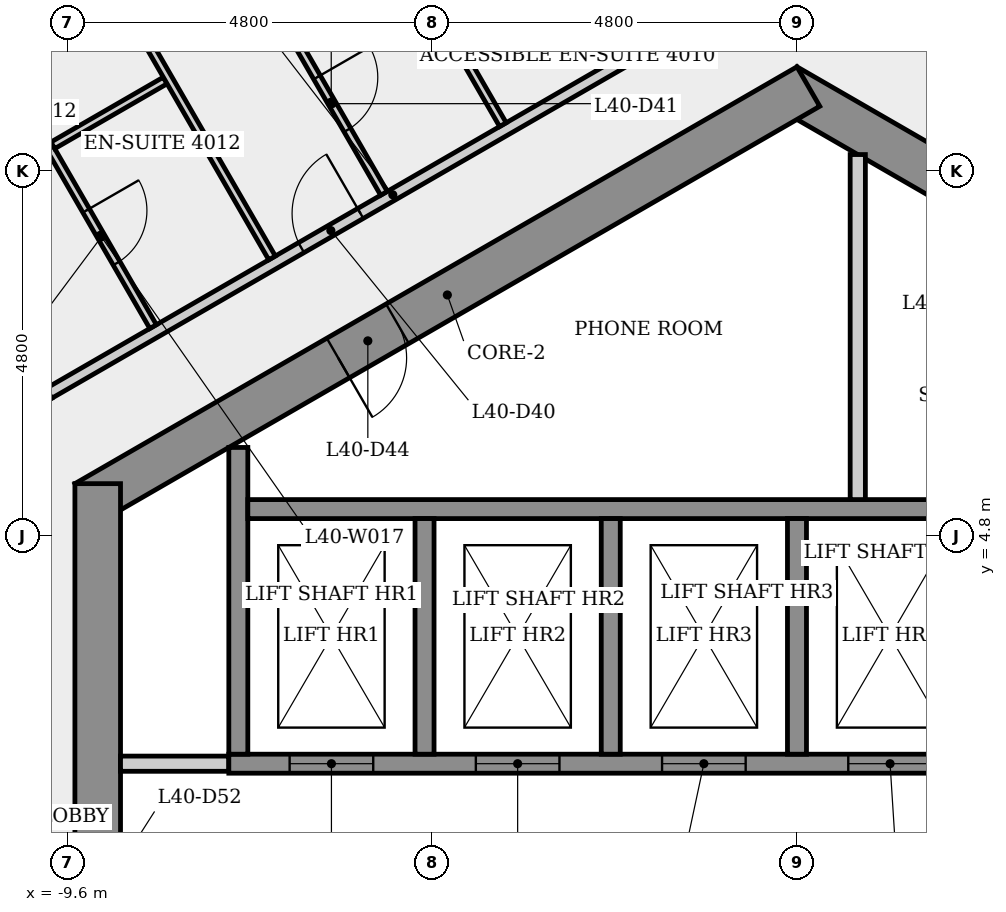
"""IFC4 building model, lengths in metres.
Left out: names, types, materials, properties, quantities, classifications, styles, units other than length and angle.
Written with IfcOpenShell. Run it as: python <this file> out.ifc"""

import sys

from ifc_helpers import new_model, si_unit, direction, frame, frame_2d, origin, place, context, subcontext, project, spatial, rectangle, extrude, element, fill, save


model = new_model("IFC4")
c1 = context("Model", 3, precision=1e-05, world=origin(), true_north=direction((0.0, 1.0)))
c2 = subcontext(c1, "Body", "Model", "MODEL_VIEW")
j1 = project(units=[si_unit("LENGTHUNIT", "METRE"), si_unit("PLANEANGLEUNIT", "RADIAN")], contexts=[c1])
p1 = place(None, origin())
s1 = spatial("IfcSite", under=j1, at=p1, CompositionType="ELEMENT")
p2 = place(p1, origin())
s2 = spatial("IfcBuilding", under=s1, at=p2, CompositionType="ELEMENT")
p3 = place(p2, frame((0.0, 0.0, 152.7)))
s3 = spatial("IfcBuildingStorey", under=s2, at=p3, CompositionType="ELEMENT", Elevation=152.7)
p4 = place(p3, frame((9.35, 5.225, 0.0), z_axis=(0.0, 0.0, 1.0), x_axis=(-0.866023993627, 0.500002442456, 0.0)))
e1 = element("IfcWall", 1, at=p4, inside=s3, PredefinedType="SHEAR", context=c2, shape_type="SweptSolid", body=[
    extrude(rectangle(XDim=10.97, YDim=0.6, at=frame_2d((5.485, 0.0))), origin(), (0.0, 0.0, 1.0), 3.4),
])
p5 = place(p4, frame((7.518, 0.0, 0.0)))
e2 = element("IfcOpeningElement", 2, at=p5, cuts=e1, PredefinedType="OPENING", context=c2, shape_type="SweptSolid", body=[
    extrude(rectangle(XDim=0.9, YDim=2.1, at=frame_2d((0.45, 1.05))), frame((0.0, 0.31, 0.0), z_axis=(0.0, -1.0, 0.0), x_axis=(1.0, 0.0, 0.0)), (0.0, 0.0, 1.0), 0.62),
])
p6 = place(p4, frame((1.172, 0.0, 0.0)))
e3 = element("IfcOpeningElement", 3, at=p6, cuts=e1, PredefinedType="OPENING", context=c2, shape_type="SweptSolid", body=[
    extrude(rectangle(XDim=0.9, YDim=2.1, at=frame_2d((0.45, 1.05))), frame((0.0, 0.31, 0.0), z_axis=(0.0, -1.0, 0.0), x_axis=(1.0, 0.0, 0.0)), (0.0, 0.0, 1.0), 0.62),
])
p7 = place(p3, frame((0.15, 10.71, 0.0), z_axis=(0.0, 0.0, 1.0), x_axis=(-0.866023993627, -0.500002442456, 0.0)))
e4 = element("IfcWall", 4, at=p7, inside=s3, PredefinedType="SHEAR", context=c2, shape_type="SweptSolid", body=[
    extrude(rectangle(XDim=10.97, YDim=0.6, at=frame_2d((5.485, 0.0))), origin(), (0.0, 0.0, 1.0), 3.4),
])
p8 = place(p7, frame((6.243, 0.0, 0.0)))
e5 = element("IfcOpeningElement", 5, at=p8, cuts=e4, PredefinedType="OPENING", context=c2, shape_type="SweptSolid", body=[
    extrude(rectangle(XDim=0.9, YDim=2.1, at=frame_2d((0.45, 1.05))), frame((0.0, 0.31, 0.0), z_axis=(0.0, -1.0, 0.0), x_axis=(1.0, 0.0, 0.0)), (0.0, 0.0, 1.0), 0.62),
])
p9 = place(p3, frame((-9.2, 5.485, 0.0), z_axis=(0.0, 0.0, 1.0), x_axis=(0.0, -1.0, 0.0)))
e6 = element("IfcWall", 6, at=p9, inside=s3, PredefinedType="SHEAR", context=c2, shape_type="SweptSolid", body=[
    extrude(rectangle(XDim=10.97, YDim=0.6, at=frame_2d((5.485, 0.0))), origin(), (0.0, 0.0, 1.0), 3.4),
])
p10 = place(p9, frame((8.516, 0.0, 0.0)))
e7 = element("IfcOpeningElement", 7, at=p10, cuts=e6, PredefinedType="OPENING", context=c2, shape_type="SweptSolid", body=[
    extrude(rectangle(XDim=0.9, YDim=2.1, at=frame_2d((0.45, 1.05))), frame((0.0, 0.31, 0.0), z_axis=(0.0, -1.0, 0.0), x_axis=(1.0, 0.0, 0.0)), (0.0, 0.0, 1.0), 0.62),
])
p11 = place(p9, frame((4.685, 0.0, 0.0)))
e8 = element("IfcOpeningElement", 8, at=p11, cuts=e6, PredefinedType="OPENING", context=c2, shape_type="SweptSolid", body=[
    extrude(rectangle(XDim=1.6, YDim=2.1, at=frame_2d((0.8, 1.05))), frame((0.0, 0.31, 0.0), z_axis=(0.0, -1.0, 0.0), x_axis=(1.0, 0.0, 0.0)), (0.0, 0.0, 1.0), 0.62),
])
p12 = place(p3, frame((-9.841, 6.674, 0.0), z_axis=(0.0, 0.0, 1.0), x_axis=(0.866024077368, 0.500002297414, 0.0)))
e9 = element("IfcWall", 9, at=p12, inside=s3, PredefinedType="PARTITIONING", context=c2, shape_type="SweptSolid", body=[
    extrude(rectangle(XDim=10.447, YDim=0.15, at=frame_2d((5.223, 0.0))), origin(), (0.0, 0.0, 1.0), 3.05),
])
p13 = place(p12, frame((3.832, 0.0, 0.0)))
e10 = element("IfcOpeningElement", 10, at=p13, cuts=e9, PredefinedType="OPENING", context=c2, shape_type="SweptSolid", body=[
    extrude(rectangle(XDim=0.9, YDim=2.1, at=frame_2d((0.45, 1.05))), frame((0.0, 0.085, 0.0), z_axis=(0.0, -1.0, 0.0), x_axis=(1.0, 0.0, 0.0)), (0.0, 0.0, 1.0), 0.17),
])
p14 = place(p3, frame((-9.859, 9.954, 0.0), z_axis=(0.0, 0.0, 1.0), x_axis=(0.499971228071, -0.866042014628, 0.0)))
e11 = element("IfcWall", 11, at=p14, inside=s3, PredefinedType="PARTITIONING", context=c2, shape_type="SweptSolid", body=[
    extrude(rectangle(XDim=2.775, YDim=0.1, at=frame_2d((1.388, 0.0))), origin(), (0.0, 0.0, 1.0), 3.05),
])
p15 = place(p14, frame((1.012, 0.0, 0.0)))
e12 = element("IfcOpeningElement", 12, at=p15, cuts=e11, PredefinedType="OPENING", context=c2, shape_type="SweptSolid", body=[
    extrude(rectangle(XDim=0.8, YDim=2.1, at=frame_2d((0.4, 1.05))), frame((0.0, 0.06, 0.0), z_axis=(0.0, -1.0, 0.0), x_axis=(1.0, 0.0, 0.0)), (0.0, 0.0, 1.0), 0.12),
])
p16 = place(p3, frame((-8.9, 1.8, 0.0), z_axis=(0.0, 0.0, 1.0), x_axis=(1.0, 0.0, 0.0)))
e13 = element("IfcWall", 13, at=p16, inside=s3, PredefinedType="PARTITIONING", context=c2, shape_type="SweptSolid", body=[
    extrude(rectangle(XDim=1.425, YDim=0.2, at=frame_2d((0.712, 0.0))), origin(), (0.0, 0.0, 1.0), 3.05),
])
p17 = place(p3, frame((-8.312, 10.79, 0.0), z_axis=(0.0, 0.0, 1.0), x_axis=(-0.866016478054, -0.500015459501, 0.0)))
e14 = element("IfcWall", 14, at=p17, inside=s3, PredefinedType="PARTITIONING", context=c2, shape_type="SweptSolid", body=[
    extrude(rectangle(XDim=1.707, YDim=0.1, at=frame_2d((0.854, 0.0))), origin(), (0.0, 0.0, 1.0), 3.05),
])
p18 = place(p3, frame((-10.612, 14.873, 0.0), z_axis=(0.0, 0.0, 1.0), x_axis=(0.499972430261, -0.866041320595, 0.0)))
e15 = element("IfcWall", 15, at=p18, inside=s3, PredefinedType="PARTITIONING", context=c2, shape_type="SweptSolid", body=[
    extrude(rectangle(XDim=7.412, YDim=0.1, at=frame_2d((3.706, 0.0))), origin(), (0.0, 0.0, 1.0), 3.05),
])
p19 = place(p3, frame((-7.475, 1.8, 0.0), z_axis=(0.0, 0.0, 1.0), x_axis=(1.0, 0.0, 0.0)))
e16 = element("IfcWall", 16, at=p19, inside=s3, PredefinedType="SHEAR", context=c2, shape_type="SweptSolid", body=[
    extrude(rectangle(XDim=14.95, YDim=0.25, at=frame_2d((7.475, 0.0))), origin(), (0.0, 0.0, 1.0), 3.05),
])
p20 = place(p19, frame((0.8, 0.0, 0.0)))
e17 = element("IfcOpeningElement", 17, at=p20, cuts=e16, PredefinedType="OPENING", context=c2, shape_type="SweptSolid", body=[
    extrude(rectangle(XDim=1.1, YDim=2.1, at=frame_2d((0.55, 1.05))), frame((0.0, 0.135, 0.0), z_axis=(0.0, -1.0, 0.0), x_axis=(1.0, 0.0, 0.0)), (0.0, 0.0, 1.0), 0.27),
])
p21 = place(p19, frame((3.25, 0.0, 0.0)))
e18 = element("IfcOpeningElement", 18, at=p21, cuts=e16, PredefinedType="OPENING", context=c2, shape_type="SweptSolid", body=[
    extrude(rectangle(XDim=1.1, YDim=2.1, at=frame_2d((0.55, 1.05))), frame((0.0, 0.135, 0.0), z_axis=(0.0, -1.0, 0.0), x_axis=(1.0, 0.0, 0.0)), (0.0, 0.0, 1.0), 0.27),
])
p22 = place(p19, frame((5.7, 0.0, 0.0)))
e19 = element("IfcOpeningElement", 19, at=p22, cuts=e16, PredefinedType="OPENING", context=c2, shape_type="SweptSolid", body=[
    extrude(rectangle(XDim=1.1, YDim=2.1, at=frame_2d((0.55, 1.05))), frame((0.0, 0.135, 0.0), z_axis=(0.0, -1.0, 0.0), x_axis=(1.0, 0.0, 0.0)), (0.0, 0.0, 1.0), 0.27),
])
p23 = place(p19, frame((8.15, 0.0, 0.0)))
e20 = element("IfcOpeningElement", 20, at=p23, cuts=e16, PredefinedType="OPENING", context=c2, shape_type="SweptSolid", body=[
    extrude(rectangle(XDim=1.1, YDim=2.1, at=frame_2d((0.55, 1.05))), frame((0.0, 0.135, 0.0), z_axis=(0.0, -1.0, 0.0), x_axis=(1.0, 0.0, 0.0)), (0.0, 0.0, 1.0), 0.27),
])
p24 = place(p19, frame((10.6, 0.0, 0.0)))
e21 = element("IfcOpeningElement", 21, at=p24, cuts=e16, PredefinedType="OPENING", context=c2, shape_type="SweptSolid", body=[
    extrude(rectangle(XDim=1.1, YDim=2.1, at=frame_2d((0.55, 1.05))), frame((0.0, 0.135, 0.0), z_axis=(0.0, -1.0, 0.0), x_axis=(1.0, 0.0, 0.0)), (0.0, 0.0, 1.0), 0.27),
])
p25 = place(p19, frame((13.05, 0.0, 0.0)))
e22 = element("IfcOpeningElement", 22, at=p25, cuts=e16, PredefinedType="OPENING", context=c2, shape_type="SweptSolid", body=[
    extrude(rectangle(XDim=1.1, YDim=2.1, at=frame_2d((0.55, 1.05))), frame((0.0, 0.135, 0.0), z_axis=(0.0, -1.0, 0.0), x_axis=(1.0, 0.0, 0.0)), (0.0, 0.0, 1.0), 0.27),
])
p26 = place(p3, frame((-7.35, 1.925, 0.0), z_axis=(0.0, 0.0, 1.0), x_axis=(0.0, 1.0, 0.0)))
e23 = element("IfcWall", 23, at=p26, inside=s3, PredefinedType="SHEAR", context=c2, shape_type="SweptSolid", body=[
    extrude(rectangle(XDim=4.036, YDim=0.25, at=frame_2d((2.018, 0.0))), origin(), (0.0, 0.0, 1.0), 3.05),
])
p27 = place(p3, frame((-7.225, 5.15, 0.0), z_axis=(0.0, 0.0, 1.0), x_axis=(1.0, 0.0, 0.0)))
e24 = element("IfcWall", 24, at=p27, inside=s3, PredefinedType="SHEAR", context=c2, shape_type="SweptSolid", body=[
    extrude(rectangle(XDim=14.7, YDim=0.25, at=frame_2d((7.35, 0.0))), origin(), (0.0, 0.0, 1.0), 3.05),
])
p28 = place(p3, frame((-6.821, 11.708, 0.0), z_axis=(0.0, 0.0, 1.0), x_axis=(0.50000932403, -0.866020020486, 0.0)))
e25 = element("IfcWall", 25, at=p28, inside=s3, PredefinedType="PARTITIONING", context=c2, shape_type="SweptSolid", body=[
    extrude(rectangle(XDim=2.775, YDim=0.1, at=frame_2d((1.387, 0.0))), origin(), (0.0, 0.0, 1.0), 3.05),
])
p29 = place(p28, frame((1.012, 0.0, 0.0)))
e26 = element("IfcOpeningElement", 26, at=p29, cuts=e25, PredefinedType="OPENING", context=c2, shape_type="SweptSolid", body=[
    extrude(rectangle(XDim=0.8, YDim=2.1, at=frame_2d((0.4, 1.05))), frame((0.0, 0.06, 0.0), z_axis=(0.0, -1.0, 0.0), x_axis=(1.0, 0.0, 0.0)), (0.0, 0.0, 1.0), 0.12),
])
p30 = place(p3, frame((-7.575, 16.627, 0.0), z_axis=(0.0, 0.0, 1.0), x_axis=(0.500011399757, -0.866018822032, 0.0)))
e27 = element("IfcWall", 27, at=p30, inside=s3, PredefinedType="PARTITIONING", context=c2, shape_type="SweptSolid", body=[
    extrude(rectangle(XDim=7.411, YDim=0.1, at=frame_2d((3.706, 0.0))), origin(), (0.0, 0.0, 1.0), 3.05),
])
for number, where, z_axis, x_axis in (
    (28, (-4.9, 5.025, 0.0), (0.0, 0.0, 1.0), (0.0, -1.0, 0.0)),
    (29, (-2.45, 5.025, 0.0), (0.0, 0.0, 1.0), (0.0, -1.0, 0.0)),
):
    element("IfcWall", number, at=place(p3, frame(where, z_axis=z_axis, x_axis=x_axis)), inside=s3, PredefinedType="SHEAR", context=c2, shape_type="SweptSolid", body=[
        extrude(rectangle(XDim=3.1, YDim=0.25, at=frame_2d((1.55, 0.0))), origin(), (0.0, 0.0, 1.0), 3.4),
    ])
p31 = place(p3, frame((-2.304, 11.112, 0.0), z_axis=(0.0, 0.0, 1.0), x_axis=(-0.500011588718, 0.866018712932, 0.0)))
e30 = element("IfcWall", 30, at=p31, inside=s3, PredefinedType="PARTITIONING", context=c2, shape_type="SweptSolid", body=[
    extrude(rectangle(XDim=2.875, YDim=0.1, at=frame_2d((1.438, 0.0))), origin(), (0.0, 0.0, 1.0), 3.05),
])
p32 = place(p31, frame((1.038, 0.0, 0.0)))
e31 = element("IfcOpeningElement", 31, at=p32, cuts=e30, PredefinedType="OPENING", context=c2, shape_type="SweptSolid", body=[
    extrude(rectangle(XDim=0.8, YDim=2.1, at=frame_2d((0.4, 1.05))), frame((0.0, 0.06, 0.0), z_axis=(0.0, -1.0, 0.0), x_axis=(1.0, 0.0, 0.0)), (0.0, 0.0, 1.0), 0.12),
])
p33 = place(p3, frame((0.0, 5.025, 0.0), z_axis=(0.0, 0.0, 1.0), x_axis=(0.0, -1.0, 0.0)))
e32 = element("IfcWall", 32, at=p33, inside=s3, PredefinedType="SHEAR", context=c2, shape_type="SweptSolid", body=[
    extrude(rectangle(XDim=3.1, YDim=0.25, at=frame_2d((1.55, 0.0))), origin(), (0.0, 0.0, 1.0), 3.4),
])
p34 = place(p3, frame((0.8, 9.815, 0.0), z_axis=(0.0, 0.0, 1.0), x_axis=(0.0, -1.0, 0.0)))
e33 = element("IfcWall", 33, at=p34, inside=s3, PredefinedType="PARTITIONING", context=c2, shape_type="SweptSolid", body=[
    extrude(rectangle(XDim=4.54, YDim=0.2, at=frame_2d((2.27, 0.0))), origin(), (0.0, 0.0, 1.0), 3.05),
])
p35 = place(p20, origin())
e34 = element("IfcDoor", 34, at=p35, inside=s3, OperationType="SLIDING_TO_LEFT", PredefinedType="DOOR", context=c2, shape_type="SweptSolid", body=[
    extrude(rectangle(XDim=1.1, YDim=2.1, at=frame_2d((0.55, 1.05))), frame((0.0, 0.025, 0.0), z_axis=(0.0, -1.0, 0.0), x_axis=(1.0, 0.0, 0.0)), (0.0, 0.0, 1.0), 0.05),
])
fill(e17, e34)
p36 = place(p21, origin())
e35 = element("IfcDoor", 35, at=p36, inside=s3, OperationType="SLIDING_TO_LEFT", PredefinedType="DOOR", context=c2, shape_type="SweptSolid", body=[
    extrude(rectangle(XDim=1.1, YDim=2.1, at=frame_2d((0.55, 1.05))), frame((0.0, 0.025, 0.0), z_axis=(0.0, -1.0, 0.0), x_axis=(1.0, 0.0, 0.0)), (0.0, 0.0, 1.0), 0.05),
])
fill(e18, e35)
p37 = place(p22, origin())
e36 = element("IfcDoor", 36, at=p37, inside=s3, OperationType="SLIDING_TO_LEFT", PredefinedType="DOOR", context=c2, shape_type="SweptSolid", body=[
    extrude(rectangle(XDim=1.1, YDim=2.1, at=frame_2d((0.55, 1.05))), frame((0.0, 0.025, 0.0), z_axis=(0.0, -1.0, 0.0), x_axis=(1.0, 0.0, 0.0)), (0.0, 0.0, 1.0), 0.05),
])
fill(e19, e36)
p38 = place(p23, origin())
e37 = element("IfcDoor", 37, at=p38, inside=s3, OperationType="SLIDING_TO_LEFT", PredefinedType="DOOR", context=c2, shape_type="SweptSolid", body=[
    extrude(rectangle(XDim=1.1, YDim=2.1, at=frame_2d((0.55, 1.05))), frame((0.0, 0.025, 0.0), z_axis=(0.0, -1.0, 0.0), x_axis=(1.0, 0.0, 0.0)), (0.0, 0.0, 1.0), 0.05),
])
fill(e20, e37)
p39 = place(p13, origin())
e38 = element("IfcDoor", 38, at=p39, inside=s3, OperationType="SINGLE_SWING_RIGHT", PredefinedType="DOOR", context=c2, shape_type="SweptSolid", body=[
    extrude(rectangle(XDim=0.9, YDim=2.1, at=frame_2d((0.45, 1.05))), frame((0.0, 0.025, 0.0), z_axis=(0.0, -1.0, 0.0), x_axis=(1.0, 0.0, 0.0)), (0.0, 0.0, 1.0), 0.05),
])
fill(e10, e38)
p40 = place(p29, origin())
e39 = element("IfcDoor", 39, at=p40, inside=s3, OperationType="SINGLE_SWING_LEFT", PredefinedType="DOOR", context=c2, shape_type="SweptSolid", body=[
    extrude(rectangle(XDim=0.8, YDim=2.1, at=frame_2d((0.4, 1.05))), frame((0.0, 0.025, 0.0), z_axis=(0.0, -1.0, 0.0), x_axis=(1.0, 0.0, 0.0)), (0.0, 0.0, 1.0), 0.05),
])
fill(e26, e39)
p41 = place(p15, origin())
e40 = element("IfcDoor", 40, at=p41, inside=s3, OperationType="SINGLE_SWING_LEFT", PredefinedType="DOOR", context=c2, shape_type="SweptSolid", body=[
    extrude(rectangle(XDim=0.8, YDim=2.1, at=frame_2d((0.4, 1.05))), frame((0.0, 0.025, 0.0), z_axis=(0.0, -1.0, 0.0), x_axis=(1.0, 0.0, 0.0)), (0.0, 0.0, 1.0), 0.05),
])
fill(e12, e40)
p42 = place(p8, origin())
e41 = element("IfcDoor", 41, at=p42, inside=s3, OperationType="SINGLE_SWING_RIGHT", PredefinedType="DOOR", context=c2, shape_type="SweptSolid", body=[
    extrude(rectangle(XDim=0.9, YDim=2.1, at=frame_2d((0.45, 1.05))), frame((0.0, 0.025, 0.0), z_axis=(0.0, -1.0, 0.0), x_axis=(1.0, 0.0, 0.0)), (0.0, 0.0, 1.0), 0.05),
])
fill(e5, e41)
save(model, sys.argv[1])
